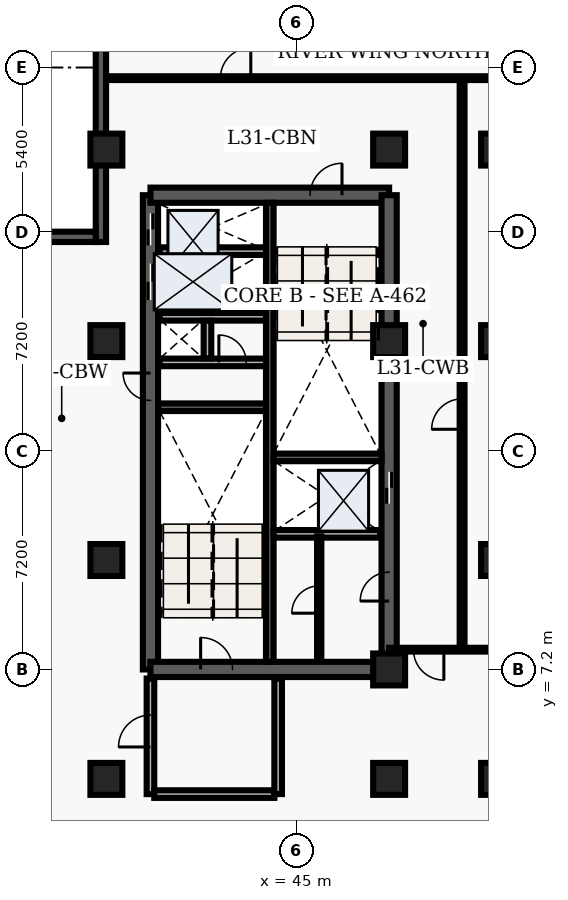
"""IFC4 building model, lengths in metres.
Left out: names, types, materials, properties, quantities, classifications, styles, units other than length and angle.
Written with IfcOpenShell. Run it as: python <this file> out.ifc"""

import sys

from ifc_helpers import new_model, entity, si_unit, converted_unit, direction, frame, origin_with_axes, origin_2d_with_axis, place, context, subcontext, project, spatial, polyline, rectangle, outline, extrude, element, fill, save


model = new_model("IFC4")
c1 = context("Model", 3, precision=1e-05, world=origin_with_axes(), true_north=direction((0.0, 1.0)))
c2 = subcontext(c1, "Body", "Model", "MODEL_VIEW")
j1 = project(units=[si_unit("LENGTHUNIT", "METRE"), converted_unit("PLANEANGLEUNIT", "DEGREE", entity("IfcPlaneAngleMeasure", 0.017), si_unit("PLANEANGLEUNIT", "RADIAN"), dimensions=[0, 0, 0, 0, 0, 0, 0])], contexts=[c1])
p1 = place(None, origin_with_axes())
s1 = spatial("IfcSite", under=j1, at=p1, CompositionType="ELEMENT")
p2 = place(p1, origin_with_axes())
s2 = spatial("IfcBuilding", under=s1, at=p2, CompositionType="ELEMENT")
p3 = place(p2, frame((0.0, 0.0, 129.0), z_axis=(0.0, 0.0, 1.0), x_axis=(1.0, 0.0, 0.0)))
s3 = spatial("IfcBuildingStorey", under=s2, at=p3, CompositionType="ELEMENT", Elevation=129.0)
p4 = place(p3, frame((40.2, 7.2, 0.0), z_axis=(0.0, 0.0, 1.0), x_axis=(0.0, 1.0, 0.0)))
e1 = element("IfcWall", 1, at=p4, inside=s3, PredefinedType="SHEAR", context=c2, shape_type="SweptSolid", body=[
    extrude(outline(polyline([(0.0, -0.25), (15.6, -0.25), (15.6, 0.25), (0.0, 0.25), (0.0, -0.25)])), origin_with_axes(), (0.0, 0.0, 1.0), 3.66),
])
p5 = place(p4, frame((14.475, 0.0, 0.0), z_axis=(0.0, 0.0, 1.0), x_axis=(1.0, 0.0, 0.0)))
e2 = element("IfcOpeningElement", 2, at=p5, cuts=e1, PredefinedType="OPENING", context=c2, shape_type="SweptSolid", body=[
    extrude(rectangle(XDim=1.05, YDim=0.52, at=origin_2d_with_axis()), origin_with_axes(), (0.0, 0.0, 1.0), 2.15),
])
p6 = place(p4, frame((12.75, 0.0, 0.0), z_axis=(0.0, 0.0, 1.0), x_axis=(1.0, 0.0, 0.0)))
e3 = element("IfcOpeningElement", 3, at=p6, cuts=e1, PredefinedType="OPENING", context=c2, shape_type="SweptSolid", body=[
    extrude(rectangle(XDim=1.2, YDim=0.52, at=origin_2d_with_axis()), origin_with_axes(), (0.0, 0.0, 1.0), 2.15),
])
p7 = place(p4, frame((9.3, 0.0, 0.0), z_axis=(0.0, 0.0, 1.0), x_axis=(1.0, 0.0, 0.0)))
e4 = element("IfcOpeningElement", 4, at=p7, cuts=e1, PredefinedType="OPENING", context=c2, shape_type="SweptSolid", body=[
    extrude(rectangle(XDim=0.9, YDim=0.52, at=origin_2d_with_axis()), origin_with_axes(), (0.0, 0.0, 1.0), 2.15),
])
p8 = place(p3, frame((40.2, 7.2, 0.0), z_axis=(0.0, 0.0, 1.0), x_axis=(1.0, 0.0, 0.0)))
e5 = element("IfcWall", 5, at=p8, inside=s3, PredefinedType="SHEAR", context=c2, shape_type="SweptSolid", body=[
    extrude(outline(polyline([(0.0, -0.25), (7.85, -0.25), (7.85, 0.25), (0.0, 0.25), (0.0, -0.25)])), origin_with_axes(), (0.0, 0.0, 1.0), 3.66),
])
p9 = place(p8, frame((2.175, 0.0, 0.0), z_axis=(0.0, 0.0, 1.0), x_axis=(1.0, 0.0, 0.0)))
e6 = element("IfcOpeningElement", 6, at=p9, cuts=e5, PredefinedType="OPENING", context=c2, shape_type="SweptSolid", body=[
    extrude(rectangle(XDim=1.05, YDim=0.52, at=origin_2d_with_axis()), origin_with_axes(), (0.0, 0.0, 1.0), 2.15),
])
p10 = place(p3, frame((40.2, 22.8, 0.0), z_axis=(0.0, 0.0, 1.0), x_axis=(1.0, 0.0, 0.0)))
e7 = element("IfcWall", 7, at=p10, inside=s3, PredefinedType="SHEAR", context=c2, shape_type="SweptSolid", body=[
    extrude(outline(polyline([(0.0, -0.25), (7.85, -0.25), (7.85, 0.25), (0.0, 0.25), (0.0, -0.25)])), origin_with_axes(), (0.0, 0.0, 1.0), 3.66),
])
p11 = place(p10, frame((5.775, 0.0, 0.0), z_axis=(0.0, 0.0, 1.0), x_axis=(1.0, 0.0, 0.0)))
e8 = element("IfcOpeningElement", 8, at=p11, cuts=e7, PredefinedType="OPENING", context=c2, shape_type="SweptSolid", body=[
    extrude(rectangle(XDim=1.05, YDim=0.52, at=origin_2d_with_axis()), origin_with_axes(), (0.0, 0.0, 1.0), 2.15),
])
p12 = place(p3, frame((48.05, 7.2, 0.0), z_axis=(0.0, 0.0, 1.0), x_axis=(0.0, 1.0, 0.0)))
e9 = element("IfcWall", 9, at=p12, inside=s3, PredefinedType="SHEAR", context=c2, shape_type="SweptSolid", body=[
    extrude(outline(polyline([(0.0, -0.25), (15.6, -0.25), (15.6, 0.25), (0.0, 0.25), (0.0, -0.25)])), origin_with_axes(), (0.0, 0.0, 1.0), 3.66),
])
p13 = place(p12, frame((5.975, 0.0, 0.0), z_axis=(0.0, 0.0, 1.0), x_axis=(1.0, 0.0, 0.0)))
e10 = element("IfcOpeningElement", 10, at=p13, cuts=e9, PredefinedType="OPENING", context=c2, shape_type="SweptSolid", body=[
    extrude(rectangle(XDim=1.05, YDim=0.52, at=origin_2d_with_axis()), origin_with_axes(), (0.0, 0.0, 1.0), 2.15),
])
p14 = place(p12, frame((2.725, 0.0, 0.0), z_axis=(0.0, 0.0, 1.0), x_axis=(1.0, 0.0, 0.0)))
e11 = element("IfcOpeningElement", 11, at=p14, cuts=e9, PredefinedType="OPENING", context=c2, shape_type="SweptSolid", body=[
    extrude(rectangle(XDim=0.95, YDim=0.52, at=origin_2d_with_axis()), origin_with_axes(), (0.0, 0.0, 1.0), 2.15),
])
p15 = place(p3, frame((44.125, 7.45, 0.0), z_axis=(0.0, 0.0, 1.0), x_axis=(0.0, 1.0, 0.0)))
e12 = element("IfcWall", 12, at=p15, inside=s3, PredefinedType="SHEAR", context=c2, shape_type="SweptSolid", body=[
    extrude(outline(polyline([(0.0, -0.125), (15.1, -0.125), (15.1, 0.125), (0.0, 0.125), (0.0, -0.125)])), origin_with_axes(), (0.0, 0.0, 1.0), 3.66),
])
for number, where, z_axis, x_axis in (
    (13, (40.45, 15.825, 0.0), (0.0, 0.0, 1.0), (1.0, 0.0, 0.0)),
    (14, (44.25, 14.175, 0.0), (0.0, 0.0, 1.0), (1.0, 0.0, 0.0)),
):
    element("IfcWall", number, at=place(p3, frame(where, z_axis=z_axis, x_axis=x_axis)), inside=s3, PredefinedType="SHEAR", context=c2, shape_type="SweptSolid", body=[
        extrude(outline(polyline([(0.0, -0.125), (3.55, -0.125), (3.55, 0.125), (0.0, 0.125), (0.0, -0.125)])), origin_with_axes(), (0.0, 0.0, 1.0), 3.66),
    ])
p16 = place(p3, frame((40.5, 17.3, 0.0), z_axis=(0.0, 0.0, 1.0), x_axis=(1.0, 0.0, 0.0)))
e15 = element("IfcWall", 15, at=p16, inside=s3, PredefinedType="SOLIDWALL", context=c2, shape_type="SweptSolid", body=[
    extrude(outline(polyline([(0.0, -0.125), (3.5, -0.125), (3.5, 0.125), (0.0, 0.125), (0.0, -0.125)])), origin_with_axes(), (0.0, 0.0, 1.0), 2.7),
])
p17 = place(p16, frame((2.4, 0.0, 0.0), z_axis=(0.0, 0.0, 1.0), x_axis=(1.0, 0.0, 0.0)))
e16 = element("IfcOpeningElement", 16, at=p17, cuts=e15, PredefinedType="OPENING", context=c2, shape_type="SweptSolid", body=[
    extrude(rectangle(XDim=0.9, YDim=0.27, at=origin_2d_with_axis()), origin_with_axes(), (0.0, 0.0, 1.0), 2.15),
])
p18 = place(p3, frame((40.5, 18.8, 0.0), z_axis=(0.0, 0.0, 1.0), x_axis=(1.0, 0.0, 0.0)))
e17 = element("IfcWall", 17, at=p18, inside=s3, PredefinedType="SOLIDWALL", context=c2, shape_type="SweptSolid", body=[
    extrude(outline(polyline([(0.0, -0.125), (3.5, -0.125), (3.5, 0.125), (0.0, 0.125), (0.0, -0.125)])), origin_with_axes(), (0.0, 0.0, 1.0), 2.7),
])
p19 = place(p3, frame((42.075, 17.43, 0.0), z_axis=(0.0, 0.0, 1.0), x_axis=(0.0, 1.0, 0.0)))
e18 = element("IfcWall", 18, at=p19, inside=s3, PredefinedType="SOLIDWALL", context=c2, shape_type="SweptSolid", body=[
    extrude(outline(polyline([(0.0, -0.125), (1.24, -0.125), (1.24, 0.125), (0.0, 0.125), (0.0, -0.125)])), origin_with_axes(), (0.0, 0.0, 1.0), 2.7),
])
p20 = place(p3, frame((40.2, 3.1, 0.0), z_axis=(0.0, 0.0, 1.0), x_axis=(0.0, 1.0, 0.0)))
e19 = element("IfcWall", 19, at=p20, inside=s3, PredefinedType="SOLIDWALL", context=c2, shape_type="SweptSolid", body=[
    extrude(outline(polyline([(0.0, -0.125), (3.8, -0.125), (3.8, 0.125), (0.0, 0.125), (0.0, -0.125)])), origin_with_axes(), (0.0, 0.0, 1.0), 2.7),
])
p21 = place(p20, frame((2.075, 0.0, 0.0), z_axis=(0.0, 0.0, 1.0), x_axis=(1.0, 0.0, 0.0)))
e20 = element("IfcOpeningElement", 20, at=p21, cuts=e19, PredefinedType="OPENING", context=c2, shape_type="SweptSolid", body=[
    extrude(rectangle(XDim=1.05, YDim=0.27, at=origin_2d_with_axis()), origin_with_axes(), (0.0, 0.0, 1.0), 2.15),
])
p22 = place(p3, frame((40.325, 3.1, 0.0), z_axis=(0.0, 0.0, 1.0), x_axis=(1.0, 0.0, 0.0)))
e21 = element("IfcWall", 21, at=p22, inside=s3, PredefinedType="SOLIDWALL", context=c2, shape_type="SweptSolid", body=[
    extrude(outline(polyline([(0.0, -0.125), (3.95, -0.125), (3.95, 0.125), (0.0, 0.125), (0.0, -0.125)])), origin_with_axes(), (0.0, 0.0, 1.0), 2.7),
])
p23 = place(p3, frame((44.4, 3.1, 0.0), z_axis=(0.0, 0.0, 1.0), x_axis=(0.0, 1.0, 0.0)))
e22 = element("IfcWall", 22, at=p23, inside=s3, PredefinedType="SOLIDWALL", context=c2, shape_type="SweptSolid", body=[
    extrude(outline(polyline([(0.0, -0.125), (3.8, -0.125), (3.8, 0.125), (0.0, 0.125), (0.0, -0.125)])), origin_with_axes(), (0.0, 0.0, 1.0), 2.7),
])
for number, where, z_axis, x_axis in (
    (23, (38.75, 3.6, 0.0), (0.0, 0.0, 1.0), (1.0, 0.0, 0.0)),
    (24, (38.75, 10.8, 0.0), (0.0, 0.0, 1.0), (1.0, 0.0, 0.0)),
    (25, (38.75, 18.0, 0.0), (0.0, 0.0, 1.0), (1.0, 0.0, 0.0)),
    (26, (38.75, 24.3, 0.0), (0.0, 0.0, 1.0), (1.0, 0.0, 0.0)),
    (27, (48.05, 3.6, 0.0), (0.0, 0.0, 1.0), (1.0, 0.0, 0.0)),
    (28, (48.05, 7.2, 0.0), (0.0, 0.0, 1.0), (1.0, 0.0, 0.0)),
    (29, (48.05, 18.0, 0.0), (0.0, 0.0, 1.0), (1.0, 0.0, 0.0)),
    (30, (48.05, 24.3, 0.0), (0.0, 0.0, 1.0), (1.0, 0.0, 0.0)),
    (31, (51.6, 3.6, 0.0), (0.0, 0.0, 1.0), (1.0, 0.0, 0.0)),
    (32, (51.6, 10.8, 0.0), (0.0, 0.0, 1.0), (1.0, 0.0, 0.0)),
    (33, (51.6, 18.0, 0.0), (0.0, 0.0, 1.0), (1.0, 0.0, 0.0)),
    (34, (51.6, 24.3, 0.0), (0.0, 0.0, 1.0), (1.0, 0.0, 0.0)),
):
    element("IfcColumn", number, at=place(p3, frame(where, z_axis=z_axis, x_axis=x_axis)), inside=s3, PredefinedType="COLUMN", context=c2, shape_type="SweptSolid", body=[
        extrude(rectangle(XDim=1.05, YDim=1.05, at=origin_2d_with_axis()), origin_with_axes(), (0.0, 0.0, 1.0), 3.9),
    ])
for number, where, z_axis, x_axis in (
    (35, (40.5, 20.96, 0.0), (0.0, 0.0, 1.0), (1.0, 0.0, 0.0)),
    (36, (44.25, 11.66, 0.0), (0.0, 0.0, 1.0), (1.0, 0.0, 0.0)),
):
    element("IfcWall", number, at=place(p3, frame(where, z_axis=z_axis, x_axis=x_axis)), inside=s3, PredefinedType="SOLIDWALL", context=c2, shape_type="SweptSolid", body=[
        extrude(outline(polyline([(0.0, -0.125), (3.5, -0.125), (3.5, 0.125), (0.0, 0.125), (0.0, -0.125)])), origin_with_axes(), (0.0, 0.0, 1.0), 2.7),
    ])
p24 = place(p3, frame((45.75, 7.5, 0.0), z_axis=(0.0, 0.0, 1.0), x_axis=(0.0, 1.0, 0.0)))
e37 = element("IfcWall", 37, at=p24, inside=s3, PredefinedType="PARTITIONING", context=c2, shape_type="SweptSolid", body=[
    extrude(outline(polyline([(0.0, -0.07), (4.08, -0.07), (4.08, 0.07), (0.0, 0.07), (0.0, -0.07)])), origin_with_axes(), (0.0, 0.0, 1.0), 2.7),
])
p25 = place(p24, frame((2.0, 0.0, 0.0), z_axis=(0.0, 0.0, 1.0), x_axis=(1.0, 0.0, 0.0)))
e38 = element("IfcOpeningElement", 38, at=p25, cuts=e37, PredefinedType="OPENING", context=c2, shape_type="SweptSolid", body=[
    extrude(rectangle(XDim=0.9, YDim=0.16, at=origin_2d_with_axis()), origin_with_axes(), (0.0, 0.0, 1.0), 2.15),
])
p26 = place(p3, frame((50.45, 7.85, 0.0), z_axis=(0.0, 0.0, 1.0), x_axis=(0.0, 1.0, 0.0)))
e39 = element("IfcWall", 39, at=p26, inside=s3, PredefinedType="PARTITIONING", context=c2, shape_type="SweptSolid", body=[
    extrude(outline(polyline([(0.0, -0.08), (18.8, -0.08), (18.8, 0.08), (0.0, 0.08), (0.0, -0.08)])), origin_with_axes(), (0.0, 0.0, 1.0), 2.7),
])
p27 = place(p26, frame((7.75, 0.0, 0.0), z_axis=(0.0, 0.0, 1.0), x_axis=(1.0, 0.0, 0.0)))
e40 = element("IfcOpeningElement", 40, at=p27, cuts=e39, PredefinedType="OPENING", context=c2, shape_type="SweptSolid", body=[
    extrude(rectangle(XDim=1.0, YDim=0.18, at=origin_2d_with_axis()), origin_with_axes(), (0.0, 0.0, 1.0), 2.15),
])
p28 = place(p3, frame((59.665, 7.85, 0.0), z_axis=(0.0, 0.0, 1.0), x_axis=(-1.0, 0.0, 0.0)))
e41 = element("IfcWall", 41, at=p28, inside=s3, PredefinedType="PARTITIONING", context=c2, shape_type="SweptSolid", body=[
    extrude(outline(polyline([(0.0, -0.062), (11.615, -0.062), (11.615, 0.062), (0.0, 0.062), (0.0, -0.062)])), origin_with_axes(), (0.0, 0.0, 1.0), 2.7),
])
p29 = place(p28, frame((10.315, 0.0, 0.0), z_axis=(0.0, 0.0, 1.0), x_axis=(1.0, 0.0, 0.0)))
e42 = element("IfcOpeningElement", 42, at=p29, cuts=e41, PredefinedType="OPENING", context=c2, shape_type="SweptSolid", body=[
    extrude(rectangle(XDim=1.0, YDim=0.145, at=origin_2d_with_axis()), origin_with_axes(), (0.0, 0.0, 1.0), 2.15),
])
p30 = place(p3, frame((38.735, 26.65, 0.0), z_axis=(0.0, 0.0, 1.0), x_axis=(1.0, 0.0, 0.0)))
e43 = element("IfcWall", 43, at=p30, inside=s3, PredefinedType="PARTITIONING", context=c2, shape_type="SweptSolid", body=[
    extrude(outline(polyline([(0.0, -0.062), (20.905, -0.062), (20.905, 0.062), (0.0, 0.062), (0.0, -0.062)])), origin_with_axes(), (0.0, 0.0, 1.0), 2.7),
])
p31 = place(p30, frame((4.265, 0.0, 0.0), z_axis=(0.0, 0.0, 1.0), x_axis=(1.0, 0.0, 0.0)))
e44 = element("IfcOpeningElement", 44, at=p31, cuts=e43, PredefinedType="OPENING", context=c2, shape_type="SweptSolid", body=[
    extrude(rectangle(XDim=1.0, YDim=0.145, at=origin_2d_with_axis()), origin_with_axes(), (0.0, 0.0, 1.0), 2.15),
])
p32 = place(p3, frame((38.57, 21.26, 0.0), z_axis=(0.0, 0.0, 1.0), x_axis=(0.0, 1.0, 0.0)))
e45 = element("IfcWall", 45, at=p32, inside=s3, PredefinedType="SOLIDWALL", context=c2, shape_type="SweptSolid", body=[
    extrude(outline(polyline([(0.0, -0.17), (7.54, -0.17), (7.54, 0.17), (0.0, 0.17), (0.0, -0.17)])), origin_with_axes(), (0.0, 0.0, 1.0), 3.66),
])
p33 = place(p3, frame((21.288, 21.43, 0.0), z_axis=(0.0, 0.0, 1.0), x_axis=(1.0, 0.0, 0.0)))
e46 = element("IfcWall", 46, at=p33, inside=s3, PredefinedType="SOLIDWALL", context=c2, shape_type="SweptSolid", body=[
    extrude(outline(polyline([(0.0, -0.17), (17.112, -0.17), (17.112, 0.17), (0.0, 0.17), (0.0, -0.17)])), origin_with_axes(), (0.0, 0.0, 1.0), 3.66),
])
p34 = place(p33, frame((3.252, 0.0, 0.45), z_axis=(0.0, 0.0, 1.0), x_axis=(1.0, 0.0, 0.0)))
e47 = element("IfcOpeningElement", 47, at=p34, cuts=e46, PredefinedType="OPENING", context=c2, shape_type="SweptSolid", body=[
    extrude(rectangle(XDim=1.8, YDim=0.36, at=origin_2d_with_axis()), origin_with_axes(), (0.0, 0.0, 1.0), 2.1),
])
p35 = place(p33, frame((9.406, 0.0, 0.45), z_axis=(0.0, 0.0, 1.0), x_axis=(1.0, 0.0, 0.0)))
e48 = element("IfcOpeningElement", 48, at=p35, cuts=e46, PredefinedType="OPENING", context=c2, shape_type="SweptSolid", body=[
    extrude(rectangle(XDim=1.8, YDim=0.36, at=origin_2d_with_axis()), origin_with_axes(), (0.0, 0.0, 1.0), 2.1),
])
p36 = place(p33, frame((13.41, 0.0, 0.45), z_axis=(0.0, 0.0, 1.0), x_axis=(1.0, 0.0, 0.0)))
e49 = element("IfcOpeningElement", 49, at=p36, cuts=e46, PredefinedType="OPENING", context=c2, shape_type="SweptSolid", body=[
    extrude(rectangle(XDim=1.8, YDim=0.36, at=origin_2d_with_axis()), origin_with_axes(), (0.0, 0.0, 1.0), 2.1),
])
p37 = place(p12, frame((5.975, 0.0, 0.0), z_axis=(0.0, 0.0, 1.0), x_axis=(1.0, 0.0, 0.0)))
e50 = element("IfcDoor", 50, at=p37, inside=s3, OperationType="SLIDING_TO_LEFT", PredefinedType="DOOR", context=c2, shape_type="SweptSolid", body=[
    extrude(rectangle(XDim=1.05, YDim=0.09, at=origin_2d_with_axis()), origin_with_axes(), (0.0, 0.0, 1.0), 2.15),
])
fill(e10, e50)
p38 = place(p4, frame((14.475, 0.0, 0.0), z_axis=(0.0, 0.0, 1.0), x_axis=(1.0, 0.0, 0.0)))
e51 = element("IfcDoor", 51, at=p38, inside=s3, OperationType="SLIDING_TO_RIGHT", PredefinedType="DOOR", context=c2, shape_type="SweptSolid", body=[
    extrude(rectangle(XDim=1.05, YDim=0.09, at=origin_2d_with_axis()), origin_with_axes(), (0.0, 0.0, 1.0), 2.15),
])
fill(e2, e51)
p39 = place(p4, frame((12.75, 0.0, 0.0), z_axis=(0.0, 0.0, 1.0), x_axis=(1.0, 0.0, 0.0)))
e52 = element("IfcDoor", 52, at=p39, inside=s3, OperationType="DOUBLE_DOOR_SLIDING", PredefinedType="DOOR", context=c2, shape_type="SweptSolid", body=[
    extrude(rectangle(XDim=1.2, YDim=0.09, at=origin_2d_with_axis()), origin_with_axes(), (0.0, 0.0, 1.0), 2.15),
])
fill(e3, e52)
p40 = place(p4, frame((9.3, 0.0, 0.0), z_axis=(0.0, 0.0, 1.0), x_axis=(1.0, 0.0, 0.0)))
e53 = element("IfcDoor", 53, at=p40, inside=s3, OperationType="SINGLE_SWING_RIGHT", PredefinedType="DOOR", context=c2, shape_type="SweptSolid", body=[
    extrude(rectangle(XDim=0.9, YDim=0.09, at=origin_2d_with_axis()), origin_with_axes(), (0.0, 0.0, 1.0), 2.15),
])
fill(e4, e53)
p41 = place(p16, frame((2.4, 0.0, 0.0), z_axis=(0.0, 0.0, 1.0), x_axis=(1.0, 0.0, 0.0)))
e54 = element("IfcDoor", 54, at=p41, inside=s3, OperationType="SINGLE_SWING_LEFT", PredefinedType="DOOR", context=c2, shape_type="SweptSolid", body=[
    extrude(rectangle(XDim=0.9, YDim=0.09, at=origin_2d_with_axis()), origin_with_axes(), (0.0, 0.0, 1.0), 2.15),
])
fill(e16, e54)
p42 = place(p8, frame((2.175, 0.0, 0.0), z_axis=(0.0, 0.0, 1.0), x_axis=(1.0, 0.0, 0.0)))
e55 = element("IfcDoor", 55, at=p42, inside=s3, OperationType="SINGLE_SWING_LEFT", PredefinedType="DOOR", context=c2, shape_type="SweptSolid", body=[
    extrude(rectangle(XDim=1.05, YDim=0.09, at=origin_2d_with_axis()), origin_with_axes(), (0.0, 0.0, 1.0), 2.15),
])
fill(e6, e55)
p43 = place(p10, frame((5.775, 0.0, 0.0), z_axis=(0.0, 0.0, 1.0), x_axis=(1.0, 0.0, 0.0)))
e56 = element("IfcDoor", 56, at=p43, inside=s3, OperationType="SINGLE_SWING_RIGHT", PredefinedType="DOOR", context=c2, shape_type="SweptSolid", body=[
    extrude(rectangle(XDim=1.05, YDim=0.09, at=origin_2d_with_axis()), origin_with_axes(), (0.0, 0.0, 1.0), 2.15),
])
fill(e8, e56)
p44 = place(p20, frame((2.075, 0.0, 0.0), z_axis=(0.0, 0.0, 1.0), x_axis=(1.0, 0.0, 0.0)))
e57 = element("IfcDoor", 57, at=p44, inside=s3, OperationType="SINGLE_SWING_LEFT", PredefinedType="DOOR", context=c2, shape_type="SweptSolid", body=[
    extrude(rectangle(XDim=1.05, YDim=0.09, at=origin_2d_with_axis()), origin_with_axes(), (0.0, 0.0, 1.0), 2.15),
])
fill(e20, e57)
p45 = place(p24, frame((2.0, 0.0, 0.0), z_axis=(0.0, 0.0, 1.0), x_axis=(1.0, 0.0, 0.0)))
e58 = element("IfcDoor", 58, at=p45, inside=s3, OperationType="SINGLE_SWING_LEFT", PredefinedType="DOOR", context=c2, shape_type="SweptSolid", body=[
    extrude(rectangle(XDim=0.9, YDim=0.084, at=origin_2d_with_axis()), origin_with_axes(), (0.0, 0.0, 1.0), 2.15),
])
fill(e38, e58)
p46 = place(p12, frame((2.725, 0.0, 0.0), z_axis=(0.0, 0.0, 1.0), x_axis=(1.0, 0.0, 0.0)))
e59 = element("IfcDoor", 59, at=p46, inside=s3, OperationType="SINGLE_SWING_LEFT", PredefinedType="DOOR", context=c2, shape_type="SweptSolid", body=[
    extrude(rectangle(XDim=0.95, YDim=0.09, at=origin_2d_with_axis()), origin_with_axes(), (0.0, 0.0, 1.0), 2.15),
])
fill(e11, e59)
p47 = place(p28, frame((10.315, 0.0, 0.0), z_axis=(0.0, 0.0, 1.0), x_axis=(1.0, 0.0, 0.0)))
e60 = element("IfcDoor", 60, at=p47, inside=s3, OperationType="SINGLE_SWING_LEFT", PredefinedType="DOOR", context=c2, shape_type="SweptSolid", body=[
    extrude(rectangle(XDim=1.0, YDim=0.075, at=origin_2d_with_axis()), origin_with_axes(), (0.0, 0.0, 1.0), 2.15),
])
fill(e42, e60)
p48 = place(p30, frame((4.265, 0.0, 0.0), z_axis=(0.0, 0.0, 1.0), x_axis=(1.0, 0.0, 0.0)))
e61 = element("IfcDoor", 61, at=p48, inside=s3, OperationType="SINGLE_SWING_RIGHT", PredefinedType="DOOR", context=c2, shape_type="SweptSolid", body=[
    extrude(rectangle(XDim=1.0, YDim=0.075, at=origin_2d_with_axis()), origin_with_axes(), (0.0, 0.0, 1.0), 2.15),
])
fill(e44, e61)
p49 = place(p26, frame((7.75, 0.0, 0.0), z_axis=(0.0, 0.0, 1.0), x_axis=(1.0, 0.0, 0.0)))
e62 = element("IfcDoor", 62, at=p49, inside=s3, OperationType="SINGLE_SWING_LEFT", PredefinedType="DOOR", context=c2, shape_type="SweptSolid", body=[
    extrude(rectangle(XDim=1.0, YDim=0.09, at=origin_2d_with_axis()), origin_with_axes(), (0.0, 0.0, 1.0), 2.15),
])
fill(e40, e62)
save(model, sys.argv[1])
